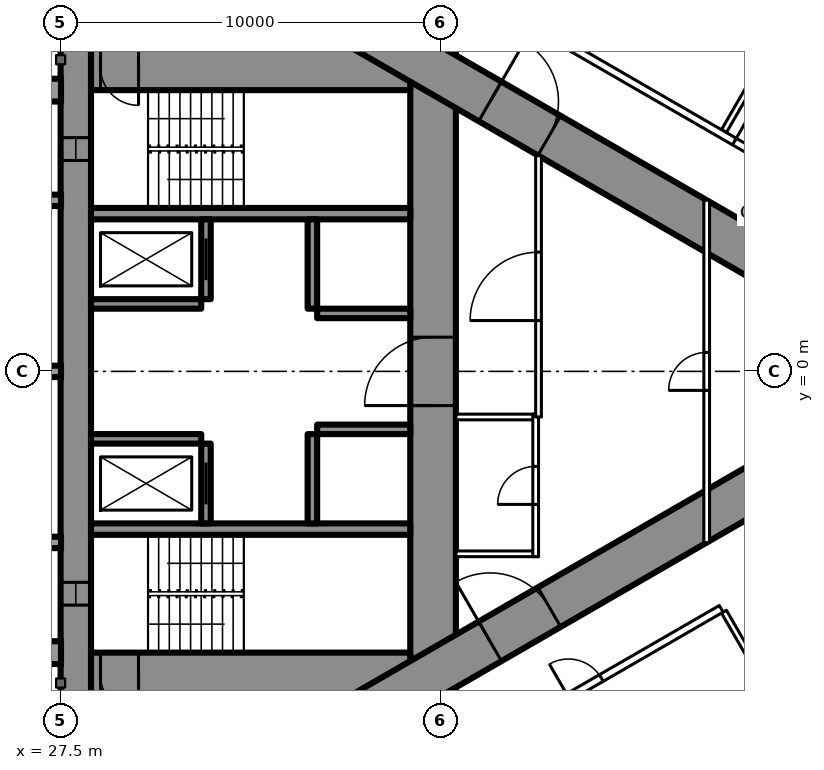
"""IFC4 building model, lengths in metres.
Left out: names, types, materials, properties, quantities, classifications, styles, units other than length and angle.
Written with IfcOpenShell. Run it as: python <this file> out.ifc"""

import sys

from ifc_helpers import new_model, si_unit, direction, frame, frame_2d, origin, place, context, subcontext, project, spatial, rectangle, extrude, element, fill, save


model = new_model("IFC4")
c1 = context("Model", 3, precision=1e-05, world=origin(), true_north=direction((0.0, 1.0)))
c2 = subcontext(c1, "Body", "Model", "MODEL_VIEW")
j1 = project(units=[si_unit("LENGTHUNIT", "METRE"), si_unit("PLANEANGLEUNIT", "RADIAN")], contexts=[c1])
p1 = place(None, origin())
s1 = spatial("IfcSite", under=j1, at=p1, CompositionType="ELEMENT")
p2 = place(p1, origin())
s2 = spatial("IfcBuilding", under=s1, at=p2, CompositionType="ELEMENT")
p3 = place(p2, frame((0.0, 0.0, 104.6)))
s3 = spatial("IfcBuildingStorey", under=s2, at=p3, CompositionType="ELEMENT", Elevation=104.6)
p4 = place(p3, frame((27.9, -8.6, 0.0), z_axis=(0.0, 0.0, 1.0), x_axis=(0.0, 1.0, 0.0)))
e1 = element("IfcWall", 1, at=p4, inside=s3, PredefinedType="SHEAR", context=c2, shape_type="SweptSolid", body=[
    extrude(rectangle(XDim=17.2, YDim=0.8, at=frame_2d((8.6, 0.0))), origin(), (0.0, 0.0, 1.0), 3.5),
])
p5 = place(p4, frame((2.45, 0.0, 0.6)))
e2 = element("IfcOpeningElement", 2, at=p5, cuts=e1, PredefinedType="OPENING", context=c2, shape_type="SweptSolid", body=[
    extrude(rectangle(XDim=0.6, YDim=2.1, at=frame_2d((0.3, 1.05))), frame((0.0, 0.41, 0.0), z_axis=(0.0, -1.0, 0.0), x_axis=(1.0, 0.0, 0.0)), (0.0, 0.0, 1.0), 0.82),
])
p6 = place(p4, frame((14.15, 0.0, 0.6)))
e3 = element("IfcOpeningElement", 3, at=p6, cuts=e1, PredefinedType="OPENING", context=c2, shape_type="SweptSolid", body=[
    extrude(rectangle(XDim=0.6, YDim=2.1, at=frame_2d((0.3, 1.05))), frame((0.0, 0.41, 0.0), z_axis=(0.0, -1.0, 0.0), x_axis=(1.0, 0.0, 0.0)), (0.0, 0.0, 1.0), 0.82),
])
p7 = place(p3, frame((37.3, -8.6, 0.0), z_axis=(0.0, 0.0, 1.0), x_axis=(0.0, 1.0, 0.0)))
e4 = element("IfcWall", 4, at=p7, inside=s3, PredefinedType="SHEAR", context=c2, shape_type="SweptSolid", body=[
    extrude(rectangle(XDim=17.2, YDim=1.2, at=frame_2d((8.6, 0.0))), origin(), (0.0, 0.0, 1.0), 3.5),
])
p8 = place(p7, frame((7.7, 0.0, 0.0)))
e5 = element("IfcOpeningElement", 5, at=p8, cuts=e4, PredefinedType="OPENING", context=c2, shape_type="SweptSolid", body=[
    extrude(rectangle(XDim=1.8, YDim=2.2, at=frame_2d((0.9, 1.1))), frame((0.0, 0.61, 0.0), z_axis=(0.0, -1.0, 0.0), x_axis=(1.0, 0.0, 0.0)), (0.0, 0.0, 1.0), 1.22),
])
p9 = place(p3, frame((28.3, -8.0, 0.0), z_axis=(0.0, 0.0, 1.0), x_axis=(1.0, 0.0, 0.0)))
e6 = element("IfcWall", 6, at=p9, inside=s3, PredefinedType="SHEAR", context=c2, shape_type="SweptSolid", body=[
    extrude(rectangle(XDim=8.4, YDim=1.2, at=frame_2d((4.2, 0.0))), origin(), (0.0, 0.0, 1.0), 3.5),
])
p10 = place(p9, frame((0.25, 0.0, 0.0)))
e7 = element("IfcOpeningElement", 7, at=p10, cuts=e6, PredefinedType="OPENING", context=c2, shape_type="SweptSolid", body=[
    extrude(rectangle(XDim=1.0, YDim=2.2, at=frame_2d((0.5, 1.1))), frame((0.0, 0.61, 0.0), z_axis=(0.0, -1.0, 0.0), x_axis=(1.0, 0.0, 0.0)), (0.0, 0.0, 1.0), 1.22),
])
p11 = place(p3, frame((28.3, 8.0, 0.0), z_axis=(0.0, 0.0, 1.0), x_axis=(1.0, 0.0, 0.0)))
e8 = element("IfcWall", 8, at=p11, inside=s3, PredefinedType="SHEAR", context=c2, shape_type="SweptSolid", body=[
    extrude(rectangle(XDim=8.4, YDim=1.2, at=frame_2d((4.2, 0.0))), origin(), (0.0, 0.0, 1.0), 3.5),
])
p12 = place(p11, frame((0.25, 0.0, 0.0)))
e9 = element("IfcOpeningElement", 9, at=p12, cuts=e8, PredefinedType="OPENING", context=c2, shape_type="SweptSolid", body=[
    extrude(rectangle(XDim=1.0, YDim=2.2, at=frame_2d((0.5, 1.1))), frame((0.0, 0.61, 0.0), z_axis=(0.0, -1.0, 0.0), x_axis=(1.0, 0.0, 0.0)), (0.0, 0.0, 1.0), 1.22),
])
for number, where, z_axis, x_axis in (
    (10, (28.3, -4.15, 0.0), (0.0, 0.0, 1.0), (1.0, 0.0, 0.0)),
    (11, (28.3, 4.15, 0.0), (0.0, 0.0, 1.0), (1.0, 0.0, 0.0)),
):
    element("IfcWall", number, at=place(p3, frame(where, z_axis=z_axis, x_axis=x_axis)), inside=s3, PredefinedType="SHEAR", context=c2, shape_type="SweptSolid", body=[
        extrude(rectangle(XDim=8.4, YDim=0.3, at=frame_2d((4.2, 0.0))), origin(), (0.0, 0.0, 1.0), 3.5),
    ])
p13 = place(p3, frame((31.325, -4.0, 0.0), z_axis=(0.0, 0.0, 1.0), x_axis=(0.0, 1.0, 0.0)))
e12 = element("IfcWall", 12, at=p13, inside=s3, PredefinedType="SHEAR", context=c2, shape_type="SweptSolid", body=[
    extrude(rectangle(XDim=2.1, YDim=0.25, at=frame_2d((1.05, 0.0))), origin(), (0.0, 0.0, 1.0), 3.5),
])
p14 = place(p13, frame((0.5, 0.0, 0.0)))
e13 = element("IfcOpeningElement", 13, at=p14, cuts=e12, PredefinedType="OPENING", context=c2, shape_type="SweptSolid", body=[
    extrude(rectangle(XDim=1.1, YDim=2.2, at=frame_2d((0.55, 1.1))), frame((0.0, 0.135, 0.0), z_axis=(0.0, -1.0, 0.0), x_axis=(1.0, 0.0, 0.0)), (0.0, 0.0, 1.0), 0.27),
])
p15 = place(p3, frame((34.125, -4.0, 0.0), z_axis=(0.0, 0.0, 1.0), x_axis=(0.0, 1.0, 0.0)))
e14 = element("IfcWall", 14, at=p15, inside=s3, PredefinedType="SHEAR", context=c2, shape_type="SweptSolid", body=[
    extrude(rectangle(XDim=2.35, YDim=0.25, at=frame_2d((1.175, 0.0))), origin(), (0.0, 0.0, 1.0), 3.5),
])
p16 = place(p3, frame((28.3, -1.775, 0.0), z_axis=(0.0, 0.0, 1.0), x_axis=(1.0, 0.0, 0.0)))
e15 = element("IfcWall", 15, at=p16, inside=s3, PredefinedType="SHEAR", context=c2, shape_type="SweptSolid", body=[
    extrude(rectangle(XDim=2.9, YDim=0.25, at=frame_2d((1.45, 0.0))), origin(), (0.0, 0.0, 1.0), 3.5),
])
p17 = place(p3, frame((34.25, -1.525, 0.0), z_axis=(0.0, 0.0, 1.0), x_axis=(1.0, 0.0, 0.0)))
e16 = element("IfcWall", 16, at=p17, inside=s3, PredefinedType="SHEAR", context=c2, shape_type="SweptSolid", body=[
    extrude(rectangle(XDim=2.45, YDim=0.25, at=frame_2d((1.225, 0.0))), origin(), (0.0, 0.0, 1.0), 3.5),
])
p18 = place(p3, frame((31.325, 1.9, 0.0), z_axis=(0.0, 0.0, 1.0), x_axis=(0.0, 1.0, 0.0)))
e17 = element("IfcWall", 17, at=p18, inside=s3, PredefinedType="SHEAR", context=c2, shape_type="SweptSolid", body=[
    extrude(rectangle(XDim=2.1, YDim=0.25, at=frame_2d((1.05, 0.0))), origin(), (0.0, 0.0, 1.0), 3.5),
])
p19 = place(p18, frame((0.5, 0.0, 0.0)))
e18 = element("IfcOpeningElement", 18, at=p19, cuts=e17, PredefinedType="OPENING", context=c2, shape_type="SweptSolid", body=[
    extrude(rectangle(XDim=1.1, YDim=2.2, at=frame_2d((0.55, 1.1))), frame((0.0, 0.135, 0.0), z_axis=(0.0, -1.0, 0.0), x_axis=(1.0, 0.0, 0.0)), (0.0, 0.0, 1.0), 0.27),
])
p20 = place(p3, frame((34.125, 1.65, 0.0), z_axis=(0.0, 0.0, 1.0), x_axis=(0.0, 1.0, 0.0)))
e19 = element("IfcWall", 19, at=p20, inside=s3, PredefinedType="SHEAR", context=c2, shape_type="SweptSolid", body=[
    extrude(rectangle(XDim=2.35, YDim=0.25, at=frame_2d((1.175, 0.0))), origin(), (0.0, 0.0, 1.0), 3.5),
])
p21 = place(p3, frame((28.3, 1.775, 0.0), z_axis=(0.0, 0.0, 1.0), x_axis=(1.0, 0.0, 0.0)))
e20 = element("IfcWall", 20, at=p21, inside=s3, PredefinedType="SHEAR", context=c2, shape_type="SweptSolid", body=[
    extrude(rectangle(XDim=2.9, YDim=0.25, at=frame_2d((1.45, 0.0))), origin(), (0.0, 0.0, 1.0), 3.5),
])
p22 = place(p3, frame((34.25, 1.525, 0.0), z_axis=(0.0, 0.0, 1.0), x_axis=(1.0, 0.0, 0.0)))
e21 = element("IfcWall", 21, at=p22, inside=s3, PredefinedType="SHEAR", context=c2, shape_type="SweptSolid", body=[
    extrude(rectangle(XDim=2.45, YDim=0.25, at=frame_2d((1.225, 0.0))), origin(), (0.0, 0.0, 1.0), 3.5),
])
p23 = place(p3, frame((27.2, -13.8, 0.0), z_axis=(0.0, 0.0, 1.0), x_axis=(0.866027159892, 0.499996958321, 0.0)))
e22 = element("IfcWall", 22, at=p23, inside=s3, PredefinedType="SHEAR", context=c2, shape_type="SweptSolid", body=[
    extrude(rectangle(XDim=27.947, YDim=1.2, at=frame_2d((13.973, 0.0))), origin(), (0.0, 0.0, 1.0), 3.5),
])
p24 = place(p23, frame((4.6, 0.0, 0.0)))
e23 = element("IfcOpeningElement", 23, at=p24, cuts=e22, PredefinedType="OPENING", context=c2, shape_type="SweptSolid", body=[
    extrude(rectangle(XDim=1.0, YDim=2.2, at=frame_2d((0.5, 1.1))), frame((0.0, 0.61, 0.0), z_axis=(0.0, -1.0, 0.0), x_axis=(1.0, 0.0, 0.0)), (0.0, 0.0, 1.0), 1.22),
])
p25 = place(p23, frame((13.395, 0.0, 0.0)))
e24 = element("IfcOpeningElement", 24, at=p25, cuts=e22, PredefinedType="OPENING", context=c2, shape_type="SweptSolid", body=[
    extrude(rectangle(XDim=1.8, YDim=2.2, at=frame_2d((0.9, 1.1))), frame((0.0, 0.61, 0.0), z_axis=(0.0, -1.0, 0.0), x_axis=(1.0, 0.0, 0.0)), (0.0, 0.0, 1.0), 1.22),
])
p26 = place(p3, frame((27.2, 13.8, 0.0), z_axis=(0.0, 0.0, 1.0), x_axis=(0.866024515034, -0.500001539357, 0.0)))
e25 = element("IfcWall", 25, at=p26, inside=s3, PredefinedType="SHEAR", context=c2, shape_type="SweptSolid", body=[
    extrude(rectangle(XDim=26.907, YDim=1.2, at=frame_2d((13.454, 0.0))), origin(), (0.0, 0.0, 1.0), 3.5),
])
p27 = place(p26, frame((4.6, 0.0, 0.0)))
e26 = element("IfcOpeningElement", 26, at=p27, cuts=e25, PredefinedType="OPENING", context=c2, shape_type="SweptSolid", body=[
    extrude(rectangle(XDim=1.0, YDim=2.2, at=frame_2d((0.5, 1.1))), frame((0.0, 0.61, 0.0), z_axis=(0.0, -1.0, 0.0), x_axis=(1.0, 0.0, 0.0)), (0.0, 0.0, 1.0), 1.22),
])
p28 = place(p26, frame((13.395, 0.0, 0.0)))
e27 = element("IfcOpeningElement", 27, at=p28, cuts=e25, PredefinedType="OPENING", context=c2, shape_type="SweptSolid", body=[
    extrude(rectangle(XDim=1.8, YDim=2.2, at=frame_2d((0.9, 1.1))), frame((0.0, 0.61, 0.0), z_axis=(0.0, -1.0, 0.0), x_axis=(1.0, 0.0, 0.0)), (0.0, 0.0, 1.0), 1.22),
])
p29 = place(p3, frame((44.954, -6.321, 0.0), z_axis=(0.0, 0.0, 1.0), x_axis=(0.500018676722, -0.866014620505, 0.0)))
e28 = element("IfcWall", 28, at=p29, inside=s3, PredefinedType="PARTITIONING", context=c2, shape_type="SweptSolid", body=[
    extrude(rectangle(XDim=8.704, YDim=0.15, at=frame_2d((4.352, 0.0))), origin(), (0.0, 0.0, 1.0), 2.2),
])
p30 = place(p3, frame((44.954, 6.321, 0.0), z_axis=(0.0, 0.0, 1.0), x_axis=(0.500009815811, 0.866019736549, 0.0)))
e29 = element("IfcWall", 29, at=p30, inside=s3, PredefinedType="PARTITIONING", context=c2, shape_type="SweptSolid", body=[
    extrude(rectangle(XDim=11.424, YDim=0.15, at=frame_2d((5.712, 0.0))), origin(), (0.0, 0.0, 1.0), 3.25),
])
p31 = place(p3, frame((36.834, 10.894, 0.0), z_axis=(0.0, 0.0, 1.0), x_axis=(0.866028157229, -0.499995230863, 0.0)))
e30 = element("IfcWall", 30, at=p31, inside=s3, PredefinedType="PARTITIONING", context=c2, shape_type="SweptSolid", body=[
    extrude(rectangle(XDim=21.667, YDim=0.2, at=frame_2d((10.833, 0.0))), origin(), (0.0, 0.0, 1.0), 3.25),
])
p32 = place(p31, frame((20.117, 0.0, 0.0)))
e31 = element("IfcOpeningElement", 31, at=p32, cuts=e30, PredefinedType="OPENING", context=c2, shape_type="SweptSolid", body=[
    extrude(rectangle(XDim=0.95, YDim=2.2, at=frame_2d((0.475, 1.1))), frame((0.0, 0.11, 0.0), z_axis=(0.0, -1.0, 0.0), x_axis=(1.0, 0.0, 0.0)), (0.0, 0.0, 1.0), 0.22),
])
p33 = place(p31, frame((14.335, 0.0, 0.0)))
e32 = element("IfcOpeningElement", 32, at=p33, cuts=e30, PredefinedType="OPENING", context=c2, shape_type="SweptSolid", body=[
    extrude(rectangle(XDim=0.95, YDim=2.2, at=frame_2d((0.475, 1.1))), frame((0.0, 0.11, 0.0), z_axis=(0.0, -1.0, 0.0), x_axis=(1.0, 0.0, 0.0)), (0.0, 0.0, 1.0), 0.22),
])
p34 = place(p31, frame((9.693, 0.0, 0.0)))
e33 = element("IfcOpeningElement", 33, at=p34, cuts=e30, PredefinedType="OPENING", context=c2, shape_type="SweptSolid", body=[
    extrude(rectangle(XDim=0.95, YDim=2.2, at=frame_2d((0.475, 1.1))), frame((0.0, 0.11, 0.0), z_axis=(0.0, -1.0, 0.0), x_axis=(1.0, 0.0, 0.0)), (0.0, 0.0, 1.0), 0.22),
])
p35 = place(p31, frame((2.95, 0.0, 0.0)))
e34 = element("IfcOpeningElement", 34, at=p35, cuts=e30, PredefinedType="OPENING", context=c2, shape_type="SweptSolid", body=[
    extrude(rectangle(XDim=0.95, YDim=2.2, at=frame_2d((0.475, 1.1))), frame((0.0, 0.11, 0.0), z_axis=(0.0, -1.0, 0.0), x_axis=(1.0, 0.0, 0.0)), (0.0, 0.0, 1.0), 0.22),
])
p36 = place(p3, frame((37.96, -10.243, 0.0), z_axis=(0.0, 0.0, 1.0), x_axis=(0.86603350054, 0.499985975746, 0.0)))
e35 = element("IfcWall", 35, at=p36, inside=s3, PredefinedType="PARTITIONING", context=c2, shape_type="SweptSolid", body=[
    extrude(rectangle(XDim=7.993, YDim=0.2, at=frame_2d((3.997, 0.0))), origin(), (0.0, 0.0, 1.0), 3.25),
])
p37 = place(p36, frame((3.35, 0.0, 0.0)))
e36 = element("IfcOpeningElement", 36, at=p37, cuts=e35, PredefinedType="OPENING", context=c2, shape_type="SweptSolid", body=[
    extrude(rectangle(XDim=1.0, YDim=2.2, at=frame_2d((0.5, 1.1))), frame((0.0, 0.11, 0.0), z_axis=(0.0, -1.0, 0.0), x_axis=(1.0, 0.0, 0.0)), (0.0, 0.0, 1.0), 0.22),
])
for number, where, z_axis, x_axis in (
    (37, (37.9, -1.2, 0.0), (0.0, 0.0, 1.0), (1.0, 0.0, 0.0)),
    (38, (37.9, -4.8, 0.0), (0.0, 0.0, 1.0), (1.0, 0.0, 0.0)),
):
    element("IfcWall", number, at=place(p3, frame(where, z_axis=z_axis, x_axis=x_axis)), inside=s3, PredefinedType="PARTITIONING", context=c2, shape_type="SweptSolid", body=[
        extrude(rectangle(XDim=2.175, YDim=0.15, at=frame_2d((1.087, 0.0))), origin(), (0.0, 0.0, 1.0), 3.25),
    ])
p38 = place(p3, frame((40.0, -4.875, 0.0), z_axis=(0.0, 0.0, 1.0), x_axis=(0.0, 1.0, 0.0)))
e39 = element("IfcWall", 39, at=p38, inside=s3, PredefinedType="PARTITIONING", context=c2, shape_type="SweptSolid", body=[
    extrude(rectangle(XDim=3.75, YDim=0.15, at=frame_2d((1.875, 0.0))), origin(), (0.0, 0.0, 1.0), 3.25),
])
p39 = place(p38, frame((1.375, 0.0, 0.0)))
e40 = element("IfcOpeningElement", 40, at=p39, cuts=e39, PredefinedType="OPENING", context=c2, shape_type="SweptSolid", body=[
    extrude(rectangle(XDim=1.0, YDim=2.2, at=frame_2d((0.5, 1.1))), frame((0.0, 0.085, 0.0), z_axis=(0.0, -1.0, 0.0), x_axis=(1.0, 0.0, 0.0)), (0.0, 0.0, 1.0), 0.17),
])
p40 = place(p3, frame((40.075, -1.2, 0.0), z_axis=(0.0, 0.0, 1.0), x_axis=(0.0, 1.0, 0.0)))
e41 = element("IfcWall", 41, at=p40, inside=s3, PredefinedType="PARTITIONING", context=c2, shape_type="SweptSolid", body=[
    extrude(rectangle(XDim=6.874, YDim=0.15, at=frame_2d((3.437, 0.0))), origin(), (0.0, 0.0, 1.0), 3.25),
])
p41 = place(p40, frame((2.537, 0.0, 0.0)))
e42 = element("IfcOpeningElement", 42, at=p41, cuts=e41, PredefinedType="OPENING", context=c2, shape_type="SweptSolid", body=[
    extrude(rectangle(XDim=1.8, YDim=2.2, at=frame_2d((0.9, 1.1))), frame((0.0, 0.085, 0.0), z_axis=(0.0, -1.0, 0.0), x_axis=(1.0, 0.0, 0.0)), (0.0, 0.0, 1.0), 0.17),
])
p42 = place(p3, frame((44.5, -4.505, 0.0), z_axis=(0.0, 0.0, 1.0), x_axis=(0.0, 1.0, 0.0)))
e43 = element("IfcWall", 43, at=p42, inside=s3, PredefinedType="PARTITIONING", context=c2, shape_type="SweptSolid", body=[
    extrude(rectangle(XDim=9.009, YDim=0.15, at=frame_2d((4.505, 0.0))), origin(), (0.0, 0.0, 1.0), 2.45),
])
p43 = place(p42, frame((4.005, 0.0, 0.0)))
e44 = element("IfcOpeningElement", 44, at=p43, cuts=e43, PredefinedType="OPENING", context=c2, shape_type="SweptSolid", body=[
    extrude(rectangle(XDim=1.0, YDim=2.2, at=frame_2d((0.5, 1.1))), frame((0.0, 0.085, 0.0), z_axis=(0.0, -1.0, 0.0), x_axis=(1.0, 0.0, 0.0)), (0.0, 0.0, 1.0), 0.17),
])
p44 = place(p34, origin())
e45 = element("IfcDoor", 45, at=p44, inside=s3, OperationType="SINGLE_SWING_LEFT", PredefinedType="DOOR", context=c2, shape_type="SweptSolid", body=[
    extrude(rectangle(XDim=0.95, YDim=2.2, at=frame_2d((0.475, 1.1))), frame((0.0, 0.025, 0.0), z_axis=(0.0, -1.0, 0.0), x_axis=(1.0, 0.0, 0.0)), (0.0, 0.0, 1.0), 0.05),
])
fill(e33, e45)
p45 = place(p37, origin())
e46 = element("IfcDoor", 46, at=p45, inside=s3, OperationType="SINGLE_SWING_LEFT", PredefinedType="DOOR", context=c2, shape_type="SweptSolid", body=[
    extrude(rectangle(XDim=1.0, YDim=2.2, at=frame_2d((0.5, 1.1))), frame((0.0, 0.025, 0.0), z_axis=(0.0, -1.0, 0.0), x_axis=(1.0, 0.0, 0.0)), (0.0, 0.0, 1.0), 0.05),
])
fill(e36, e46)
p46 = place(p39, origin())
e47 = element("IfcDoor", 47, at=p46, inside=s3, OperationType="SINGLE_SWING_LEFT", PredefinedType="DOOR", context=c2, shape_type="SweptSolid", body=[
    extrude(rectangle(XDim=1.0, YDim=2.2, at=frame_2d((0.5, 1.1))), frame((0.0, 0.025, 0.0), z_axis=(0.0, -1.0, 0.0), x_axis=(1.0, 0.0, 0.0)), (0.0, 0.0, 1.0), 0.05),
])
fill(e40, e47)
p47 = place(p41, origin())
e48 = element("IfcDoor", 48, at=p47, inside=s3, OperationType="DOUBLE_DOOR_SINGLE_SWING", PredefinedType="DOOR", context=c2, shape_type="SweptSolid", body=[
    extrude(rectangle(XDim=1.8, YDim=2.2, at=frame_2d((0.9, 1.1))), frame((0.0, 0.025, 0.0), z_axis=(0.0, -1.0, 0.0), x_axis=(1.0, 0.0, 0.0)), (0.0, 0.0, 1.0), 0.05),
])
fill(e42, e48)
p48 = place(p43, origin())
e49 = element("IfcDoor", 49, at=p48, inside=s3, OperationType="SINGLE_SWING_LEFT", PredefinedType="DOOR", context=c2, shape_type="SweptSolid", body=[
    extrude(rectangle(XDim=1.0, YDim=2.2, at=frame_2d((0.5, 1.1))), frame((0.0, 0.025, 0.0), z_axis=(0.0, -1.0, 0.0), x_axis=(1.0, 0.0, 0.0)), (0.0, 0.0, 1.0), 0.05),
])
fill(e44, e49)
p49 = place(p25, origin())
e50 = element("IfcDoor", 50, at=p49, inside=s3, OperationType="DOUBLE_DOOR_SINGLE_SWING", PredefinedType="DOOR", context=c2, shape_type="SweptSolid", body=[
    extrude(rectangle(XDim=1.8, YDim=2.2, at=frame_2d((0.9, 1.1))), frame((0.0, 0.025, 0.0), z_axis=(0.0, -1.0, 0.0), x_axis=(1.0, 0.0, 0.0)), (0.0, 0.0, 1.0), 0.05),
])
fill(e24, e50)
p50 = place(p28, origin())
e51 = element("IfcDoor", 51, at=p50, inside=s3, OperationType="DOUBLE_DOOR_SINGLE_SWING", PredefinedType="DOOR", context=c2, shape_type="SweptSolid", body=[
    extrude(rectangle(XDim=1.8, YDim=2.2, at=frame_2d((0.9, 1.1))), frame((0.0, 0.025, 0.0), z_axis=(0.0, -1.0, 0.0), x_axis=(1.0, 0.0, 0.0)), (0.0, 0.0, 1.0), 0.05),
])
fill(e27, e51)
p51 = place(p8, origin())
e52 = element("IfcDoor", 52, at=p51, inside=s3, OperationType="DOUBLE_DOOR_SINGLE_SWING", PredefinedType="DOOR", context=c2, shape_type="SweptSolid", body=[
    extrude(rectangle(XDim=1.8, YDim=2.2, at=frame_2d((0.9, 1.1))), frame((0.0, 0.025, 0.0), z_axis=(0.0, -1.0, 0.0), x_axis=(1.0, 0.0, 0.0)), (0.0, 0.0, 1.0), 0.05),
])
fill(e5, e52)
p52 = place(p10, origin())
e53 = element("IfcDoor", 53, at=p52, inside=s3, OperationType="SINGLE_SWING_RIGHT", PredefinedType="DOOR", context=c2, shape_type="SweptSolid", body=[
    extrude(rectangle(XDim=1.0, YDim=2.2, at=frame_2d((0.5, 1.1))), frame((0.0, 0.025, 0.0), z_axis=(0.0, -1.0, 0.0), x_axis=(1.0, 0.0, 0.0)), (0.0, 0.0, 1.0), 0.05),
])
fill(e7, e53)
p53 = place(p12, origin())
e54 = element("IfcDoor", 54, at=p53, inside=s3, OperationType="SINGLE_SWING_RIGHT", PredefinedType="DOOR", context=c2, shape_type="SweptSolid", body=[
    extrude(rectangle(XDim=1.0, YDim=2.2, at=frame_2d((0.5, 1.1))), frame((0.0, 0.025, 0.0), z_axis=(0.0, -1.0, 0.0), x_axis=(1.0, 0.0, 0.0)), (0.0, 0.0, 1.0), 0.05),
])
fill(e9, e54)
p54 = place(p14, origin())
e55 = element("IfcDoor", 55, at=p54, inside=s3, OperationType="SLIDING_TO_LEFT", PredefinedType="USERDEFINED", context=c2, shape_type="SweptSolid", body=[
    extrude(rectangle(XDim=1.1, YDim=2.2, at=frame_2d((0.55, 1.1))), frame((0.0, 0.025, 0.0), z_axis=(0.0, -1.0, 0.0), x_axis=(1.0, 0.0, 0.0)), (0.0, 0.0, 1.0), 0.05),
])
fill(e13, e55)
p55 = place(p19, origin())
e56 = element("IfcDoor", 56, at=p55, inside=s3, OperationType="SLIDING_TO_LEFT", PredefinedType="USERDEFINED", context=c2, shape_type="SweptSolid", body=[
    extrude(rectangle(XDim=1.1, YDim=2.2, at=frame_2d((0.55, 1.1))), frame((0.0, 0.025, 0.0), z_axis=(0.0, -1.0, 0.0), x_axis=(1.0, 0.0, 0.0)), (0.0, 0.0, 1.0), 0.05),
])
fill(e18, e56)
p56 = place(p5, origin())
e57 = element("IfcWindow", 57, at=p56, inside=s3, PartitioningType="SINGLE_PANEL", PredefinedType="WINDOW", context=c2, shape_type="SweptSolid", body=[
    extrude(rectangle(XDim=0.6, YDim=2.1, at=frame_2d((0.3, 1.05))), frame((0.0, 0.03, 0.0), z_axis=(0.0, -1.0, 0.0), x_axis=(1.0, 0.0, 0.0)), (0.0, 0.0, 1.0), 0.06),
])
fill(e2, e57)
p57 = place(p6, origin())
e58 = element("IfcWindow", 58, at=p57, inside=s3, PartitioningType="SINGLE_PANEL", PredefinedType="WINDOW", context=c2, shape_type="SweptSolid", body=[
    extrude(rectangle(XDim=0.6, YDim=2.1, at=frame_2d((0.3, 1.05))), frame((0.0, 0.03, 0.0), z_axis=(0.0, -1.0, 0.0), x_axis=(1.0, 0.0, 0.0)), (0.0, 0.0, 1.0), 0.06),
])
fill(e3, e58)
save(model, sys.argv[1])
